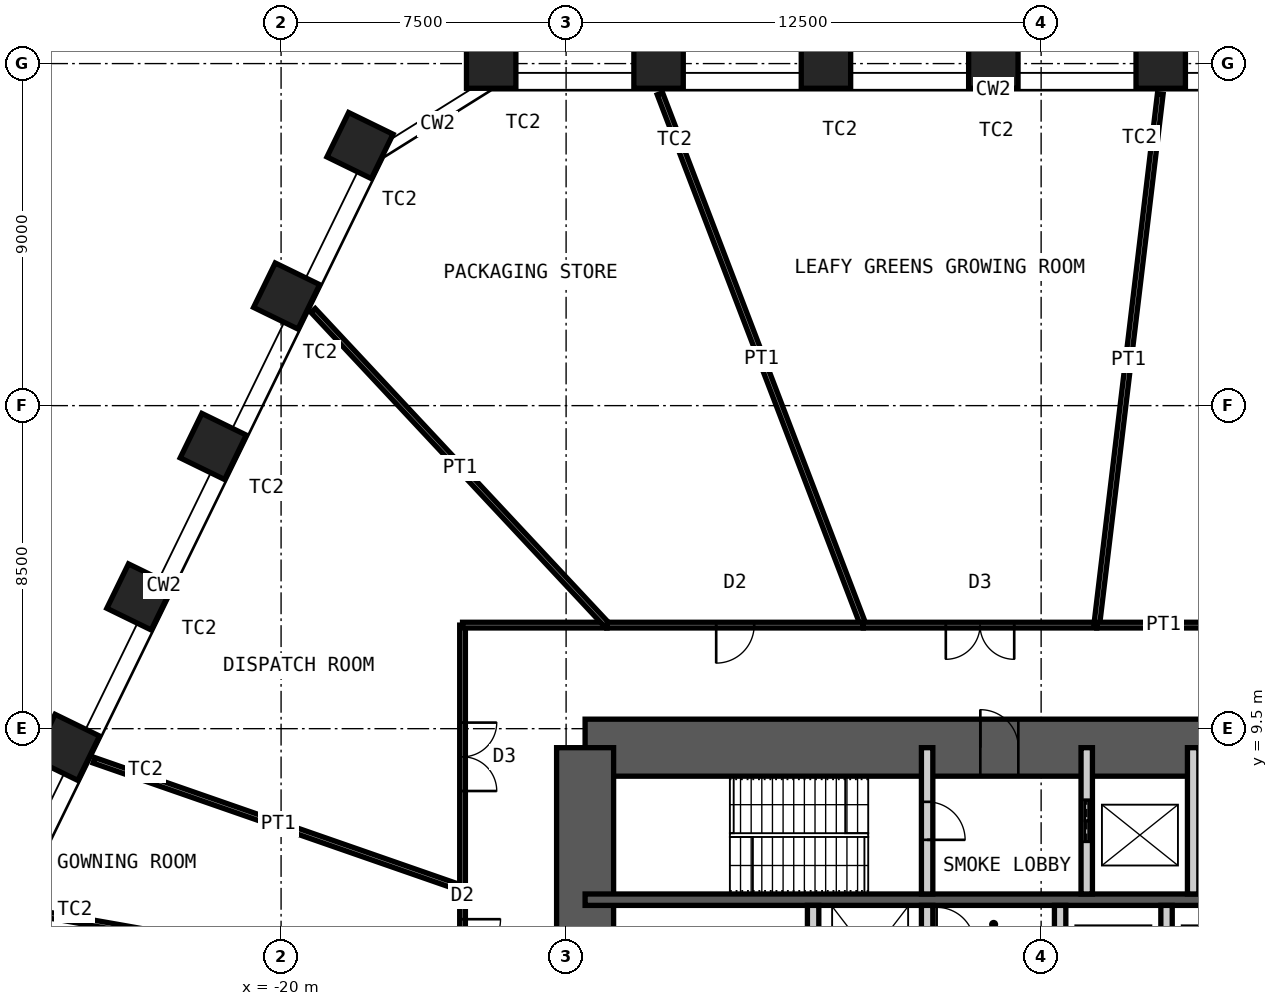
"""IFC4 building model, lengths in metres.
Left out: names, types, materials, properties, quantities, classifications, styles, units other than length and angle.
Written with IfcOpenShell. Run it as: python <this file> out.ifc"""

import sys

from ifc_helpers import new_model, si_unit, direction, frame, frame_2d, origin, origin_2d, place, context, subcontext, project, spatial, rectangle, hollow_rectangle, extrude, element, fill, save


model = new_model("IFC4")
c1 = context("Model", 3, precision=1e-05, world=origin(), true_north=direction((0.0, 1.0)))
c2 = subcontext(c1, "Body", "Model", "MODEL_VIEW")
j1 = project(units=[si_unit("LENGTHUNIT", "METRE"), si_unit("PLANEANGLEUNIT", "RADIAN")], contexts=[c1])
p1 = place(None, origin())
s1 = spatial("IfcSite", under=j1, at=p1, CompositionType="ELEMENT")
p2 = place(p1, origin())
s2 = spatial("IfcBuilding", under=s1, at=p2, CompositionType="ELEMENT")
p3 = place(p2, frame((0.0, 0.0, 87.0)))
s3 = spatial("IfcBuildingStorey", under=s2, at=p3, CompositionType="ELEMENT", Elevation=87.0)
for number, where, z_axis, x_axis in (
    (1, (-14.471, 27.0, 0.0), (0.0, 0.0, 1.0), (-1.0, 0.0, 0.0)),
    (2, (-10.067, 27.0, 0.0), (0.0, 0.0, 1.0), (-1.0, 0.0, 0.0)),
    (3, (-5.662, 27.0, 0.0), (0.0, 0.0, 1.0), (-1.0, 0.0, 0.0)),
    (4, (-1.258, 27.0, 0.0), (0.0, 0.0, 1.0), (-1.0, 0.0, 0.0)),
    (5, (3.147, 27.0, 0.0), (0.0, 0.0, 1.0), (-1.0, 0.0, 0.0)),
    (6, (-25.647, 9.008, 0.0), (0.0, 0.0, 1.0), (-0.438, -0.899, 0.0)),
    (7, (-23.716, 12.966, 0.0), (0.0, 0.0, 1.0), (-0.438, -0.899, 0.0)),
    (8, (-21.785, 16.925, 0.0), (0.0, 0.0, 1.0), (-0.438, -0.899, 0.0)),
    (9, (-19.854, 20.884, 0.0), (0.0, 0.0, 1.0), (-0.438, -0.899, 0.0)),
    (10, (-17.924, 24.843, 0.0), (0.0, 0.0, 1.0), (-0.438, -0.899, 0.0)),
):
    element("IfcColumn", number, at=place(p3, frame(where, z_axis=z_axis, x_axis=x_axis)), inside=s3, PredefinedType="COLUMN", context=c2, shape_type="SweptSolid", body=[
        extrude(hollow_rectangle(XDim=1.3, YDim=1.3, WallThickness=0.1, at=origin_2d()), origin(), (0.0, 0.0, 1.0), 5.0),
    ])
p4 = place(p3, frame((-12.0, 9.0, 0.0), z_axis=(0.0, 0.0, 1.0), x_axis=(1.0, 0.0, 0.0)))
e11 = element("IfcWall", 11, at=p4, inside=s3, PredefinedType="SHEAR", context=c2, shape_type="SweptSolid", body=[
    extrude(rectangle(XDim=24.0, YDim=1.5, at=frame_2d((12.0, 0.0))), origin(), (0.0, 0.0, 1.0), 5.0),
])
p5 = place(p4, frame((10.4, 0.0, 0.0)))
e12 = element("IfcOpeningElement", 12, at=p5, cuts=e11, PredefinedType="OPENING", context=c2, shape_type="SweptSolid", body=[
    extrude(rectangle(XDim=1.0, YDim=2.1, at=frame_2d((0.5, 1.05))), frame((0.0, 0.76, 0.0), z_axis=(0.0, -1.0, 0.0), x_axis=(1.0, 0.0, 0.0)), (0.0, 0.0, 1.0), 1.52),
])
p6 = place(p4, frame((17.6, 0.0, 0.0)))
e13 = element("IfcOpeningElement", 13, at=p6, cuts=e11, PredefinedType="OPENING", context=c2, shape_type="SweptSolid", body=[
    extrude(rectangle(XDim=0.9, YDim=2.1, at=frame_2d((0.45, 1.05))), frame((0.0, 0.76, 0.0), z_axis=(0.0, -1.0, 0.0), x_axis=(1.0, 0.0, 0.0)), (0.0, 0.0, 1.0), 1.52),
])
p7 = place(p4, frame((21.9, 0.0, 0.0)))
e14 = element("IfcOpeningElement", 14, at=p7, cuts=e11, PredefinedType="OPENING", context=c2, shape_type="SweptSolid", body=[
    extrude(rectangle(XDim=0.9, YDim=2.1, at=frame_2d((0.45, 1.05))), frame((0.0, 0.76, 0.0), z_axis=(0.0, -1.0, 0.0), x_axis=(1.0, 0.0, 0.0)), (0.0, 0.0, 1.0), 1.52),
])
p8 = place(p3, frame((-12.0, -9.0, 0.0), z_axis=(0.0, 0.0, 1.0), x_axis=(0.0, 1.0, 0.0)))
e15 = element("IfcWall", 15, at=p8, inside=s3, PredefinedType="SHEAR", context=c2, shape_type="SweptSolid", body=[
    extrude(rectangle(XDim=18.0, YDim=1.5, at=frame_2d((9.0, 0.0))), origin(), (0.0, 0.0, 1.0), 5.0),
])
p9 = place(p8, frame((8.1, 0.0, 0.0)))
e16 = element("IfcOpeningElement", 16, at=p9, cuts=e15, PredefinedType="OPENING", context=c2, shape_type="SweptSolid", body=[
    extrude(rectangle(XDim=1.8, YDim=2.1, at=frame_2d((0.9, 1.05))), frame((0.0, 0.76, 0.0), z_axis=(0.0, -1.0, 0.0), x_axis=(1.0, 0.0, 0.0)), (0.0, 0.0, 1.0), 1.52),
])
p10 = place(p3, frame((-12.0, 5.0, 0.0), z_axis=(0.0, 0.0, 1.0), x_axis=(1.0, 0.0, 0.0)))
e17 = element("IfcWall", 17, at=p10, inside=s3, PredefinedType="SHEAR", context=c2, shape_type="SweptSolid", body=[
    extrude(rectangle(XDim=24.0, YDim=0.3, at=frame_2d((12.0, 0.0))), origin(), (0.0, 0.0, 1.0), 5.0),
])
p11 = place(p3, frame((-3.0, 5.15, 0.0), z_axis=(0.0, 0.0, 1.0), x_axis=(0.0, 1.0, 0.0)))
e18 = element("IfcWall", 18, at=p11, inside=s3, PredefinedType="PARTITIONING", context=c2, shape_type="SweptSolid", body=[
    extrude(rectangle(XDim=3.85, YDim=0.3, at=frame_2d((1.925, 0.0))), origin(), (0.0, 0.0, 1.0), 4.78),
])
p12 = place(p11, frame((1.425, 0.0, 0.0)))
e19 = element("IfcOpeningElement", 19, at=p12, cuts=e18, PredefinedType="OPENING", context=c2, shape_type="SweptSolid", body=[
    extrude(rectangle(XDim=1.0, YDim=2.1, at=frame_2d((0.5, 1.05))), frame((0.0, 0.16, 0.0), z_axis=(0.0, -1.0, 0.0), x_axis=(1.0, 0.0, 0.0)), (0.0, 0.0, 1.0), 0.32),
])
p13 = place(p3, frame((1.2, 5.15, 0.0), z_axis=(0.0, 0.0, 1.0), x_axis=(0.0, 1.0, 0.0)))
e20 = element("IfcWall", 20, at=p13, inside=s3, PredefinedType="PARTITIONING", context=c2, shape_type="SweptSolid", body=[
    extrude(rectangle(XDim=3.85, YDim=0.3, at=frame_2d((1.925, 0.0))), origin(), (0.0, 0.0, 1.0), 4.78),
])
p14 = place(p13, frame((1.375, 0.0, 0.0)))
e21 = element("IfcOpeningElement", 21, at=p14, cuts=e20, PredefinedType="OPENING", context=c2, shape_type="SweptSolid", body=[
    extrude(rectangle(XDim=1.1, YDim=2.4, at=frame_2d((0.55, 1.2))), frame((0.0, 0.16, 0.0), z_axis=(0.0, -1.0, 0.0), x_axis=(1.0, 0.0, 0.0)), (0.0, 0.0, 1.0), 0.32),
])
p15 = place(p3, frame((4.0, 5.15, 0.0), z_axis=(0.0, 0.0, 1.0), x_axis=(0.0, 1.0, 0.0)))
e22 = element("IfcWall", 22, at=p15, inside=s3, PredefinedType="PARTITIONING", context=c2, shape_type="SweptSolid", body=[
    extrude(rectangle(XDim=3.85, YDim=0.3, at=frame_2d((1.925, 0.0))), origin(), (0.0, 0.0, 1.0), 4.78),
])
for number, where, z_axis, x_axis in (
    (23, (-6.0, 2.2, 0.0), (0.0, 0.0, 1.0), (0.0, 1.0, 0.0)),
    (24, (-3.0, 2.2, 0.0), (0.0, 0.0, 1.0), (0.0, 1.0, 0.0)),
    (25, (0.5, 2.2, 0.0), (0.0, 0.0, 1.0), (0.0, 1.0, 0.0)),
    (26, (3.3, 2.2, 0.0), (0.0, 0.0, 1.0), (0.0, 1.0, 0.0)),
):
    element("IfcWall", number, at=place(p3, frame(where, z_axis=z_axis, x_axis=x_axis)), inside=s3, PredefinedType="PARTITIONING", context=c2, shape_type="SweptSolid", body=[
        extrude(rectangle(XDim=2.65, YDim=0.3, at=frame_2d((1.325, 0.0))), origin(), (0.0, 0.0, 1.0), 4.78),
    ])
p16 = place(p3, frame((-10.031, 26.207, 0.0), z_axis=(0.0, 0.0, 1.0), x_axis=(0.357470544466, -0.933924413344, 0.0)))
e27 = element("IfcWall", 27, at=p16, inside=s3, PredefinedType="PARTITIONING", context=c2, shape_type="SweptSolid", body=[
    extrude(rectangle(XDim=14.971, YDim=0.15, at=frame_2d((7.485, 0.0))), origin(), (0.0, 0.0, 1.0), 3.7),
])
p17 = place(p3, frame((-4.679, 12.225, 0.0), z_axis=(0.0, 0.0, 1.0), x_axis=(1.0, 0.0, 0.0)))
e28 = element("IfcWall", 28, at=p17, inside=s3, PredefinedType="PARTITIONING", context=c2, shape_type="SweptSolid", body=[
    extrude(rectangle(XDim=6.142, YDim=0.15, at=frame_2d((3.071, 0.0))), origin(), (0.0, 0.0, 1.0), 4.8),
])
p18 = place(p17, frame((2.171, 0.0, 0.0)))
e29 = element("IfcOpeningElement", 29, at=p18, cuts=e28, PredefinedType="OPENING", context=c2, shape_type="SweptSolid", body=[
    extrude(rectangle(XDim=1.8, YDim=2.4, at=frame_2d((0.9, 1.2))), frame((0.0, 0.085, 0.0), z_axis=(0.0, -1.0, 0.0), x_axis=(1.0, 0.0, 0.0)), (0.0, 0.0, 1.0), 0.17),
])
p19 = place(p3, frame((3.135, 26.201, 0.0), z_axis=(0.0, 0.0, 1.0), x_axis=(-0.118798442734, -0.992918390405, 0.0)))
e30 = element("IfcWall", 30, at=p19, inside=s3, PredefinedType="PARTITIONING", context=c2, shape_type="SweptSolid", body=[
    extrude(rectangle(XDim=14.075, YDim=0.15, at=frame_2d((7.038, 0.0))), origin(), (0.0, 0.0, 1.0), 3.7),
])
p20 = place(p3, frame((1.463, 12.225, 0.0), z_axis=(0.0, 0.0, 1.0), x_axis=(1.0, 0.0, 0.0)))
e31 = element("IfcWall", 31, at=p20, inside=s3, PredefinedType="PARTITIONING", context=c2, shape_type="SweptSolid", body=[
    extrude(rectangle(XDim=8.788, YDim=0.15, at=frame_2d((4.394, 0.0))), origin(), (0.0, 0.0, 1.0), 4.8),
])
p21 = place(p20, frame((3.494, 0.0, 0.0)))
e32 = element("IfcOpeningElement", 32, at=p21, cuts=e31, PredefinedType="OPENING", context=c2, shape_type="SweptSolid", body=[
    extrude(rectangle(XDim=1.8, YDim=2.4, at=frame_2d((0.9, 1.2))), frame((0.0, 0.085, 0.0), z_axis=(0.0, -1.0, 0.0), x_axis=(1.0, 0.0, 0.0)), (0.0, 0.0, 1.0), 0.17),
])
p22 = place(p3, frame((-26.85, 4.725, 0.0), z_axis=(0.0, 0.0, 1.0), x_axis=(0.984867773441, -0.173307440223, 0.0)))
e33 = element("IfcWall", 33, at=p22, inside=s3, PredefinedType="PARTITIONING", context=c2, shape_type="SweptSolid", body=[
    extrude(rectangle(XDim=11.804, YDim=0.15, at=frame_2d((5.902, 0.0))), origin(), (0.0, 0.0, 1.0), 3.7),
])
p23 = place(p3, frame((-15.225, 2.679, 0.0), z_axis=(0.0, 0.0, 1.0), x_axis=(0.0, 1.0, 0.0)))
e34 = element("IfcWall", 34, at=p23, inside=s3, PredefinedType="PARTITIONING", context=c2, shape_type="SweptSolid", body=[
    extrude(rectangle(XDim=2.616, YDim=0.15, at=frame_2d((1.308, 0.0))), origin(), (0.0, 0.0, 1.0), 4.8),
])
p24 = place(p23, frame((0.808, 0.0, 0.0)))
e35 = element("IfcOpeningElement", 35, at=p24, cuts=e34, PredefinedType="OPENING", context=c2, shape_type="SweptSolid", body=[
    extrude(rectangle(XDim=1.0, YDim=2.4, at=frame_2d((0.5, 1.2))), frame((0.0, 0.085, 0.0), z_axis=(0.0, -1.0, 0.0), x_axis=(1.0, 0.0, 0.0)), (0.0, 0.0, 1.0), 0.17),
])
p25 = place(p3, frame((-24.923, 8.668, 0.0), z_axis=(0.0, 0.0, 1.0), x_axis=(0.944504494796, -0.328498492098, 0.0)))
e36 = element("IfcWall", 36, at=p25, inside=s3, PredefinedType="PARTITIONING", context=c2, shape_type="SweptSolid", body=[
    extrude(rectangle(XDim=10.268, YDim=0.15, at=frame_2d((5.134, 0.0))), origin(), (0.0, 0.0, 1.0), 3.7),
])
p26 = place(p3, frame((-15.225, 5.295, 0.0), z_axis=(0.0, 0.0, 1.0), x_axis=(0.0, 1.0, 0.0)))
e37 = element("IfcWall", 37, at=p26, inside=s3, PredefinedType="PARTITIONING", context=c2, shape_type="SweptSolid", body=[
    extrude(rectangle(XDim=6.93, YDim=0.15, at=frame_2d((3.465, 0.0))), origin(), (0.0, 0.0, 1.0), 4.8),
])
p27 = place(p26, frame((2.565, 0.0, 0.0)))
e38 = element("IfcOpeningElement", 38, at=p27, cuts=e37, PredefinedType="OPENING", context=c2, shape_type="SweptSolid", body=[
    extrude(rectangle(XDim=1.8, YDim=2.4, at=frame_2d((0.9, 1.2))), frame((0.0, 0.085, 0.0), z_axis=(0.0, -1.0, 0.0), x_axis=(1.0, 0.0, 0.0)), (0.0, 0.0, 1.0), 0.17),
])
p28 = place(p3, frame((-15.225, 12.225, 0.0), z_axis=(0.0, 0.0, 1.0), x_axis=(1.0, 0.0, 0.0)))
e39 = element("IfcWall", 39, at=p28, inside=s3, PredefinedType="PARTITIONING", context=c2, shape_type="SweptSolid", body=[
    extrude(rectangle(XDim=3.803, YDim=0.15, at=frame_2d((1.902, 0.0))), origin(), (0.0, 0.0, 1.0), 4.8),
])
p29 = place(p3, frame((-19.157, 20.504, 0.0), z_axis=(0.0, 0.0, 1.0), x_axis=(0.682695116082, -0.730703345057, 0.0)))
e40 = element("IfcWall", 40, at=p29, inside=s3, PredefinedType="PARTITIONING", context=c2, shape_type="SweptSolid", body=[
    extrude(rectangle(XDim=11.33, YDim=0.15, at=frame_2d((5.665, 0.0))), origin(), (0.0, 0.0, 1.0), 3.7),
])
p30 = place(p3, frame((-11.422, 12.225, 0.0), z_axis=(0.0, 0.0, 1.0), x_axis=(1.0, 0.0, 0.0)))
e41 = element("IfcWall", 41, at=p30, inside=s3, PredefinedType="PARTITIONING", context=c2, shape_type="SweptSolid", body=[
    extrude(rectangle(XDim=6.742, YDim=0.15, at=frame_2d((3.371, 0.0))), origin(), (0.0, 0.0, 1.0), 4.8),
])
p31 = place(p30, frame((2.871, 0.0, 0.0)))
e42 = element("IfcOpeningElement", 42, at=p31, cuts=e41, PredefinedType="OPENING", context=c2, shape_type="SweptSolid", body=[
    extrude(rectangle(XDim=1.0, YDim=2.4, at=frame_2d((0.5, 1.2))), frame((0.0, 0.085, 0.0), z_axis=(0.0, -1.0, 0.0), x_axis=(1.0, 0.0, 0.0)), (0.0, 0.0, 1.0), 0.17),
])
p32 = place(p5, origin())
e43 = element("IfcDoor", 43, at=p32, inside=s3, OperationType="SINGLE_SWING_RIGHT", PredefinedType="DOOR", context=c2, shape_type="SweptSolid", body=[
    extrude(rectangle(XDim=1.0, YDim=2.1, at=frame_2d((0.5, 1.05))), frame((0.0, 0.025, 0.0), z_axis=(0.0, -1.0, 0.0), x_axis=(1.0, 0.0, 0.0)), (0.0, 0.0, 1.0), 0.05),
])
fill(e12, e43)
p33 = place(p12, origin())
e44 = element("IfcDoor", 44, at=p33, inside=s3, OperationType="SINGLE_SWING_LEFT", PredefinedType="DOOR", context=c2, shape_type="SweptSolid", body=[
    extrude(rectangle(XDim=1.0, YDim=2.1, at=frame_2d((0.5, 1.05))), frame((0.0, 0.025, 0.0), z_axis=(0.0, -1.0, 0.0), x_axis=(1.0, 0.0, 0.0)), (0.0, 0.0, 1.0), 0.05),
])
fill(e19, e44)
p34 = place(p14, origin())
e45 = element("IfcDoor", 45, at=p34, inside=s3, OperationType="DOUBLE_DOOR_SLIDING", PredefinedType="DOOR", context=c2, shape_type="SweptSolid", body=[
    extrude(rectangle(XDim=1.1, YDim=2.4, at=frame_2d((0.55, 1.2))), frame((0.0, 0.025, 0.0), z_axis=(0.0, -1.0, 0.0), x_axis=(1.0, 0.0, 0.0)), (0.0, 0.0, 1.0), 0.05),
])
fill(e21, e45)
p35 = place(p18, origin())
e46 = element("IfcDoor", 46, at=p35, inside=s3, OperationType="DOUBLE_DOOR_DOUBLE_SWING", PredefinedType="DOOR", context=c2, shape_type="SweptSolid", body=[
    extrude(rectangle(XDim=1.8, YDim=2.4, at=frame_2d((0.9, 1.2))), frame((0.0, 0.025, 0.0), z_axis=(0.0, -1.0, 0.0), x_axis=(1.0, 0.0, 0.0)), (0.0, 0.0, 1.0), 0.05),
])
fill(e29, e46)
p36 = place(p24, origin())
e47 = element("IfcDoor", 47, at=p36, inside=s3, OperationType="SINGLE_SWING_RIGHT", PredefinedType="DOOR", context=c2, shape_type="SweptSolid", body=[
    extrude(rectangle(XDim=1.0, YDim=2.4, at=frame_2d((0.5, 1.2))), frame((0.0, 0.025, 0.0), z_axis=(0.0, -1.0, 0.0), x_axis=(1.0, 0.0, 0.0)), (0.0, 0.0, 1.0), 0.05),
])
fill(e35, e47)
p37 = place(p27, origin())
e48 = element("IfcDoor", 48, at=p37, inside=s3, OperationType="DOUBLE_DOOR_DOUBLE_SWING", PredefinedType="DOOR", context=c2, shape_type="SweptSolid", body=[
    extrude(rectangle(XDim=1.8, YDim=2.4, at=frame_2d((0.9, 1.2))), frame((0.0, 0.025, 0.0), z_axis=(0.0, -1.0, 0.0), x_axis=(1.0, 0.0, 0.0)), (0.0, 0.0, 1.0), 0.05),
])
fill(e38, e48)
p38 = place(p31, origin())
e49 = element("IfcDoor", 49, at=p38, inside=s3, OperationType="SINGLE_SWING_LEFT", PredefinedType="DOOR", context=c2, shape_type="SweptSolid", body=[
    extrude(rectangle(XDim=1.0, YDim=2.4, at=frame_2d((0.5, 1.2))), frame((0.0, 0.025, 0.0), z_axis=(0.0, -1.0, 0.0), x_axis=(1.0, 0.0, 0.0)), (0.0, 0.0, 1.0), 0.05),
])
fill(e42, e49)
save(model, sys.argv[1])
